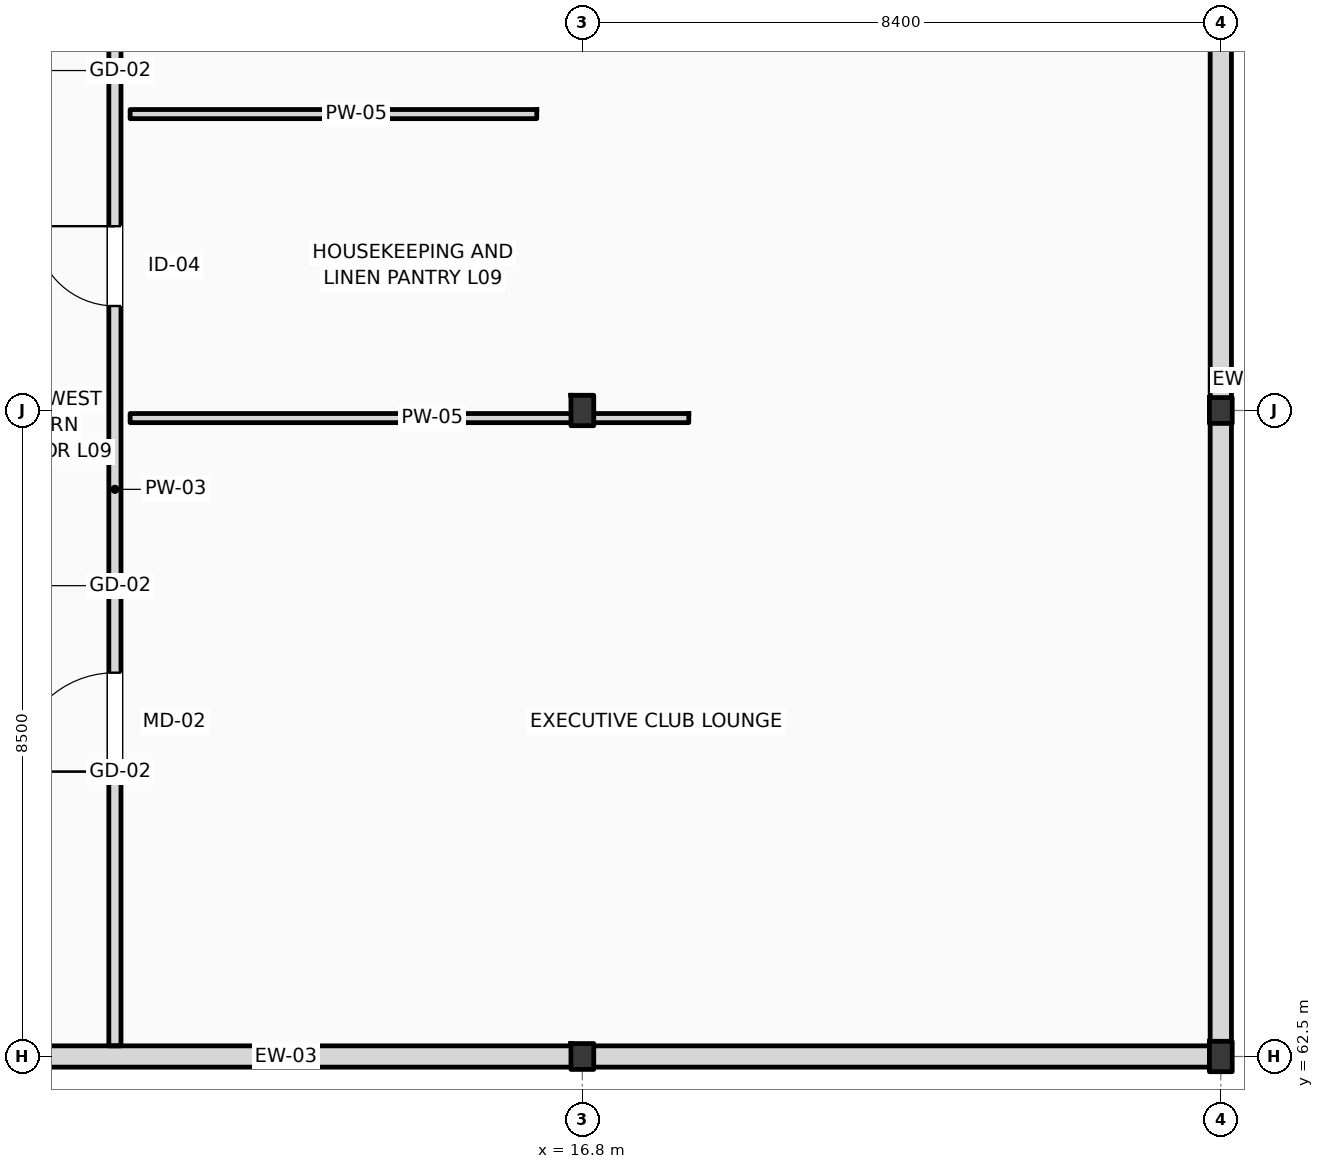
"""IFC4 building model, lengths in metres.
Left out: names, types, materials, properties, quantities, classifications, styles, units other than length and angle.
Written with IfcOpenShell. Run it as: python <this file> out.ifc"""

import sys

from ifc_helpers import new_model, si_unit, direction, frame, frame_2d, origin, origin_2d, place, context, subcontext, project, spatial, rectangle, i_section, extrude, element, fill, save


model = new_model("IFC4")
c1 = context("Model", 3, precision=1e-05, world=origin(), true_north=direction((0.0, 1.0)))
c2 = subcontext(c1, "Body", "Model", "MODEL_VIEW")
j1 = project(units=[si_unit("LENGTHUNIT", "METRE"), si_unit("PLANEANGLEUNIT", "RADIAN")], contexts=[c1])
p1 = place(None, origin())
s1 = spatial("IfcSite", under=j1, at=p1, CompositionType="ELEMENT")
p2 = place(p1, origin())
s2 = spatial("IfcBuilding", under=s1, at=p2, CompositionType="ELEMENT")
p3 = place(p2, frame((0.0, 0.0, 39.0)))
s3 = spatial("IfcBuildingStorey", under=s2, at=p3, CompositionType="ELEMENT", Elevation=39.0)
p4 = place(p3, frame((16.8, 62.5, 0.0), z_axis=(0.0, 0.0, 1.0), x_axis=(1.0, 0.0, 0.0)))
e1 = element("IfcColumn", 1, at=p4, inside=s3, PredefinedType="COLUMN", context=c2, shape_type="SweptSolid", body=[
    extrude(i_section(OverallWidth=0.3, OverallDepth=0.34, WebThickness=0.012, FlangeThickness=0.021, FilletRadius=0.027, at=origin_2d()), origin(), (0.0, 0.0, 1.0), 3.6),
])
for number, where, z_axis, x_axis in (
    (2, (16.8, 71.0, 0.0), (0.0, 0.0, 1.0), (1.0, 0.0, 0.0)),
    (3, (25.2, 62.5, 0.0), (0.0, 0.0, 1.0), (1.0, 0.0, 0.0)),
):
    element("IfcColumn", number, at=place(p3, frame(where, z_axis=z_axis, x_axis=x_axis)), inside=s3, PredefinedType="COLUMN", context=c2, shape_type="SweptSolid", body=[
        extrude(i_section(OverallWidth=0.3, OverallDepth=0.4, WebThickness=0.013, FlangeThickness=0.024, FilletRadius=0.027, at=origin_2d()), origin(), (0.0, 0.0, 1.0), 3.6),
    ])
p5 = place(p3, frame((25.2, 71.0, 0.0), z_axis=(0.0, 0.0, 1.0), x_axis=(1.0, 0.0, 0.0)))
e4 = element("IfcColumn", 4, at=p5, inside=s3, PredefinedType="COLUMN", context=c2, shape_type="SweptSolid", body=[
    extrude(i_section(OverallWidth=0.3, OverallDepth=0.34, WebThickness=0.012, FlangeThickness=0.021, FilletRadius=0.027, at=origin_2d()), origin(), (0.0, 0.0, 1.0), 3.6),
])
p6 = place(p3, frame((0.0, 62.5, 0.0), z_axis=(0.0, 0.0, 1.0), x_axis=(1.0, 0.0, 0.0)))
e5 = element("IfcWall", 5, at=p6, inside=s3, PredefinedType="STANDARD", context=c2, shape_type="SweptSolid", body=[
    extrude(rectangle(XDim=25.2, YDim=0.28, at=frame_2d((12.6, 0.0))), origin(), (0.0, 0.0, 1.0), 2.72),
])
p7 = place(p3, frame((25.2, 62.5, 0.0), z_axis=(0.0, 0.0, 1.0), x_axis=(0.0, 1.0, 0.0)))
e6 = element("IfcWall", 6, at=p7, inside=s3, PredefinedType="STANDARD", context=c2, shape_type="SweptSolid", body=[
    extrude(rectangle(XDim=17.0, YDim=0.28, at=frame_2d((8.5, 0.0))), origin(), (0.0, 0.0, 1.0), 2.91),
])
p8 = place(p3, frame((10.65, 62.64, 0.0), z_axis=(0.0, 0.0, 1.0), x_axis=(0.0, 1.0, 0.0)))
e7 = element("IfcWall", 7, at=p8, inside=s3, PredefinedType="PARTITIONING", context=c2, shape_type="SweptSolid", body=[
    extrude(rectangle(XDim=16.31, YDim=0.16, at=frame_2d((8.155, 0.0))), origin(), (0.0, 0.0, 1.0), 3.38),
])
p9 = place(p8, frame((3.61, 0.0, 0.0)))
e8 = element("IfcOpeningElement", 8, at=p9, cuts=e7, PredefinedType="OPENING", context=c2, shape_type="SweptSolid", body=[
    extrude(rectangle(XDim=1.3, YDim=2.2, at=frame_2d((0.65, 1.1))), frame((0.0, 0.09, 0.0), z_axis=(0.0, -1.0, 0.0), x_axis=(1.0, 0.0, 0.0)), (0.0, 0.0, 1.0), 0.18),
])
p10 = place(p8, frame((9.735, 0.0, 0.0)))
e9 = element("IfcOpeningElement", 9, at=p10, cuts=e7, PredefinedType="OPENING", context=c2, shape_type="SweptSolid", body=[
    extrude(rectangle(XDim=1.05, YDim=2.12, at=frame_2d((0.525, 1.06))), frame((0.0, 0.09, 0.0), z_axis=(0.0, -1.0, 0.0), x_axis=(1.0, 0.0, 0.0)), (0.0, 0.0, 1.0), 0.18),
])
p11 = place(p8, frame((13.49, 0.0, 0.0)))
e10 = element("IfcOpeningElement", 10, at=p11, cuts=e7, PredefinedType="OPENING", context=c2, shape_type="SweptSolid", body=[
    extrude(rectangle(XDim=0.94, YDim=2.15, at=frame_2d((0.47, 1.075))), frame((0.0, 0.09, 0.0), z_axis=(0.0, -1.0, 0.0), x_axis=(1.0, 0.0, 0.0)), (0.0, 0.0, 1.0), 0.18),
])
p12 = place(p3, frame((10.85, 70.9, 0.0), z_axis=(0.0, 0.0, 1.0), x_axis=(1.0, 0.0, 0.0)))
e11 = element("IfcWall", 11, at=p12, inside=s3, PredefinedType="PARTITIONING", context=c2, shape_type="SweptSolid", body=[
    extrude(rectangle(XDim=7.35, YDim=0.12, at=frame_2d((3.675, 0.0))), origin(), (0.0, 0.0, 1.0), 2.72),
])
p13 = place(p3, frame((10.85, 74.9, 0.0), z_axis=(0.0, 0.0, 1.0), x_axis=(1.0, 0.0, 0.0)))
e12 = element("IfcWall", 12, at=p13, inside=s3, PredefinedType="PARTITIONING", context=c2, shape_type="SweptSolid", body=[
    extrude(rectangle(XDim=5.35, YDim=0.12, at=frame_2d((2.675, 0.0))), origin(), (0.0, 0.0, 1.0), 3.38),
])
p14 = place(p9, origin())
e13 = element("IfcDoor", 13, at=p14, inside=s3, OperationType="SINGLE_SWING_LEFT", PredefinedType="DOOR", context=c2, shape_type="SweptSolid", body=[
    extrude(rectangle(XDim=1.3, YDim=2.2, at=frame_2d((0.65, 1.1))), frame((0.0, 0.025, 0.0), z_axis=(0.0, -1.0, 0.0), x_axis=(1.0, 0.0, 0.0)), (0.0, 0.0, 1.0), 0.05),
])
fill(e8, e13)
p15 = place(p10, origin())
e14 = element("IfcDoor", 14, at=p15, inside=s3, OperationType="SINGLE_SWING_RIGHT", PredefinedType="DOOR", context=c2, shape_type="SweptSolid", body=[
    extrude(rectangle(XDim=1.05, YDim=2.12, at=frame_2d((0.525, 1.06))), frame((0.0, 0.025, 0.0), z_axis=(0.0, -1.0, 0.0), x_axis=(1.0, 0.0, 0.0)), (0.0, 0.0, 1.0), 0.05),
])
fill(e9, e14)
save(model, sys.argv[1])
